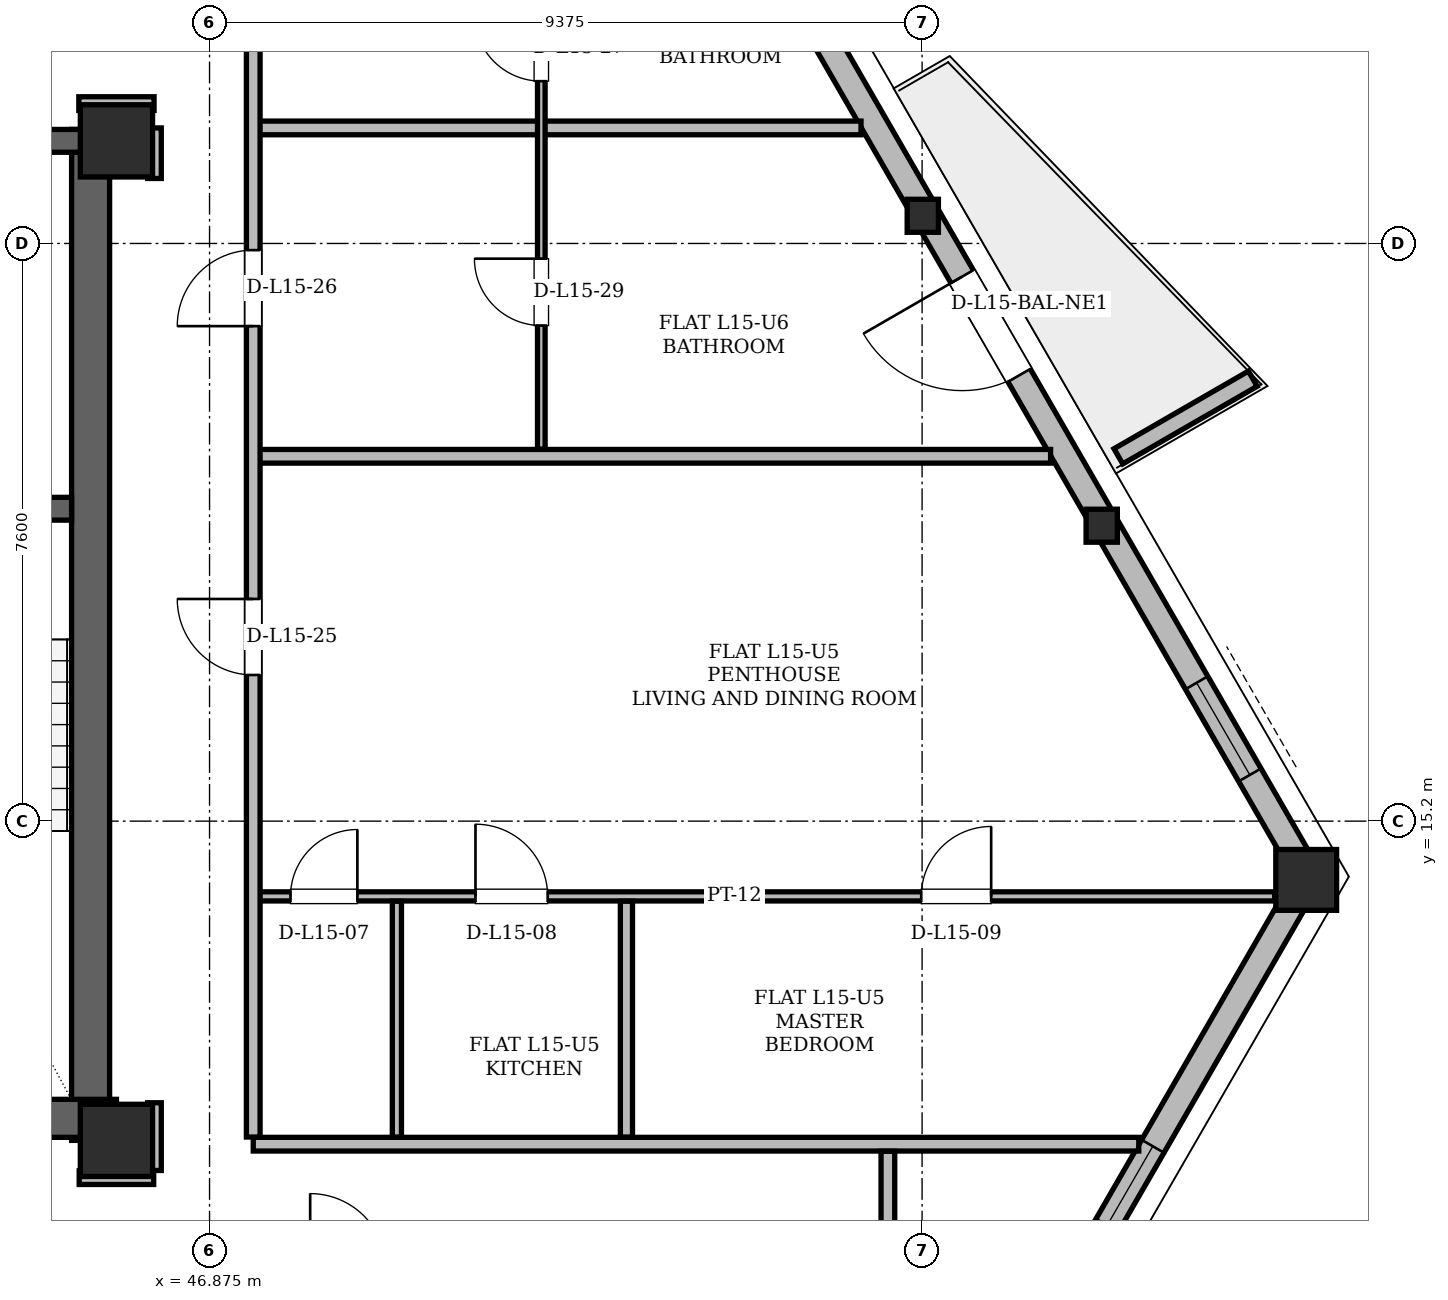
"""IFC4 building model, lengths in metres.
Left out: names, types, materials, properties, quantities, classifications, styles, units other than length and angle.
Written with IfcOpenShell. Run it as: python <this file> out.ifc"""

import sys

from ifc_helpers import new_model, si_unit, direction, frame, frame_2d, origin, origin_2d, place, context, subcontext, project, spatial, polyline, rectangle, hollow_rectangle, i_section, outline, extrude, element, fill, save


model = new_model("IFC4")
c1 = context("Model", 3, precision=1e-05, world=origin(), true_north=direction((0.0, 1.0)))
c2 = subcontext(c1, "Body", "Model", "MODEL_VIEW")
j1 = project(units=[si_unit("LENGTHUNIT", "METRE"), si_unit("PLANEANGLEUNIT", "RADIAN")], contexts=[c1])
p1 = place(None, origin())
s1 = spatial("IfcSite", under=j1, at=p1, CompositionType="ELEMENT")
p2 = place(p1, origin())
s2 = spatial("IfcBuilding", under=s1, at=p2, CompositionType="ELEMENT")
p3 = place(p2, frame((0.0, 0.0, 59.7)))
s3 = spatial("IfcBuildingStorey", under=s2, at=p3, CompositionType="ELEMENT", Elevation=59.7)
for number, where, z_axis, x_axis in (
    (1, (45.65, 11.0, 0.0), (0.0, 0.0, 1.0), (1.0, 0.0, 0.0)),
    (2, (45.65, 24.15, 0.0), (0.0, 0.0, 1.0), (1.0, 0.0, 0.0)),
):
    element("IfcColumn", number, at=place(p3, frame(where, z_axis=z_axis, x_axis=x_axis)), inside=s3, PredefinedType="COLUMN", context=c2, shape_type="SweptSolid", body=[
        extrude(hollow_rectangle(XDim=0.95, YDim=0.95, WallThickness=0.08, at=origin_2d()), origin(), (0.0, 0.0, 1.0), 3.6),
    ])
p4 = place(p3, frame((61.334, 14.47, 0.005), z_axis=(-0.016990094732, -0.024261855277, 0.99956125328), x_axis=(0.819124112374, -0.573616325192, 0.0)))
e3 = element("IfcColumn", 3, at=p4, inside=s3, PredefinedType="COLUMN", context=c2, shape_type="SweptSolid", body=[
    extrude(hollow_rectangle(XDim=0.8, YDim=0.8, WallThickness=0.065, at=origin_2d()), origin(), (0.0, 0.0, 1.0), 3.592),
])
p5 = place(p3, frame((58.647, 19.124, 0.005), z_axis=(-0.01902969331, -0.02079673626, 0.999602604305), x_axis=(0.737754315113, -0.675069307947, 0.0)))
e4 = element("IfcColumn", 4, at=p5, inside=s3, PredefinedType="COLUMN", context=c2, shape_type="SweptSolid", body=[
    extrude(i_section(OverallWidth=0.411, OverallDepth=0.434, WebThickness=0.036, FlangeThickness=0.057, at=origin_2d()), origin(), (0.0, 0.0, 1.0), 3.592),
])
p6 = place(p3, frame((56.296, 23.196, 0.005), z_axis=(-0.020729269388, -0.017806782228, 0.999626538212), x_axis=(0.651610262095, -0.758553931064, 0.0)))
e5 = element("IfcColumn", 5, at=p6, inside=s3, PredefinedType="COLUMN", context=c2, shape_type="SweptSolid", body=[
    extrude(i_section(OverallWidth=0.411, OverallDepth=0.434, WebThickness=0.036, FlangeThickness=0.057, at=origin_2d()), origin(), (0.0, 0.0, 1.0), 3.592),
])
p7 = place(p3, frame((45.31, 11.0, 0.0), z_axis=(0.0, 0.0, 1.0), x_axis=(0.0, 1.0, 0.0)))
e6 = element("IfcWall", 6, at=p7, inside=s3, PredefinedType="SHEAR", context=c2, shape_type="SweptSolid", body=[
    extrude(rectangle(XDim=13.3, YDim=0.5, at=frame_2d((6.65, 0.0))), origin(), (0.0, 0.0, 1.0), 3.36),
])
p8 = place(p3, frame((38.55, 11.29, 0.0), z_axis=(0.0, 0.0, 1.0), x_axis=(1.0, 0.0, 0.0)))
e7 = element("IfcWall", 7, at=p8, inside=s3, PredefinedType="SHEAR", context=c2, shape_type="SweptSolid", body=[
    extrude(rectangle(XDim=7.1, YDim=0.5, at=frame_2d((3.55, 0.0))), origin(), (0.0, 0.0, 1.0), 3.36),
])
p9 = place(p3, frame((29.65, 24.15, 0.0), z_axis=(0.0, 0.0, 1.0), x_axis=(1.0, 0.0, 0.0)))
e8 = element("IfcWall", 8, at=p9, inside=s3, PredefinedType="SHEAR", context=c2, shape_type="SweptSolid", body=[
    extrude(rectangle(XDim=15.7, YDim=0.3, at=frame_2d((7.85, 0.0))), origin(), (0.0, 0.0, 1.0), 3.36),
])
p10 = place(p9, frame((1.7, 0.0, 0.0)))
e9 = element("IfcOpeningElement", 9, at=p10, cuts=e8, PredefinedType="OPENING", context=c2, shape_type="SweptSolid", body=[
    extrude(rectangle(XDim=1.2, YDim=2.2, at=frame_2d((0.6, 1.1))), frame((0.0, 0.15, 0.0), z_axis=(0.0, -1.0, 0.0), x_axis=(1.0, 0.0, 0.0)), (0.0, 0.0, 1.0), 0.3),
])
p11 = place(p9, frame((12.8, 0.0, 0.0)))
e10 = element("IfcOpeningElement", 10, at=p11, cuts=e8, PredefinedType="OPENING", context=c2, shape_type="SweptSolid", body=[
    extrude(rectangle(XDim=1.2, YDim=2.2, at=frame_2d((0.6, 1.1))), frame((0.0, 0.15, 0.0), z_axis=(0.0, -1.0, 0.0), x_axis=(1.0, 0.0, 0.0)), (0.0, 0.0, 1.0), 0.3),
])
p12 = place(p9, frame((6.55, 0.0, 0.0)))
e11 = element("IfcOpeningElement", 11, at=p12, cuts=e8, PredefinedType="OPENING", context=c2, shape_type="SweptSolid", body=[
    extrude(rectangle(XDim=0.9, YDim=2.05, at=frame_2d((0.45, 1.025))), frame((0.0, 0.15, 0.0), z_axis=(0.0, -1.0, 0.0), x_axis=(1.0, 0.0, 0.0)), (0.0, 0.0, 1.0), 0.3),
])
p13 = place(p9, frame((8.45, 0.0, 0.0)))
e12 = element("IfcOpeningElement", 12, at=p13, cuts=e8, PredefinedType="OPENING", context=c2, shape_type="SweptSolid", body=[
    extrude(rectangle(XDim=0.9, YDim=2.05, at=frame_2d((0.45, 1.025))), frame((0.0, 0.15, 0.0), z_axis=(0.0, -1.0, 0.0), x_axis=(1.0, 0.0, 0.0)), (0.0, 0.0, 1.0), 0.3),
])
p14 = place(p3, frame((41.05, 19.31, 0.0), z_axis=(0.0, 0.0, 1.0), x_axis=(1.0, 0.0, 0.0)))
e13 = element("IfcWall", 13, at=p14, inside=s3, PredefinedType="SHEAR", context=c2, shape_type="SweptSolid", body=[
    extrude(rectangle(XDim=4.01, YDim=0.3, at=frame_2d((2.005, 0.0))), origin(), (0.0, 0.0, 1.0), 3.36),
])
p15 = place(p14, frame((1.6, 0.0, 0.0)))
e14 = element("IfcOpeningElement", 14, at=p15, cuts=e13, PredefinedType="OPENING", context=c2, shape_type="SweptSolid", body=[
    extrude(rectangle(XDim=1.4, YDim=2.2, at=frame_2d((0.7, 1.1))), frame((0.0, 0.15, 0.0), z_axis=(0.0, -1.0, 0.0), x_axis=(1.0, 0.0, 0.0)), (0.0, 0.0, 1.0), 0.3),
])
p16 = place(p3, frame((54.292, 2.274, 0.0), z_axis=(0.0, 0.0, 1.0), x_axis=(0.499996557917, 0.866027391063, 0.0)))
e15 = element("IfcWall", 15, at=p16, inside=s3, PredefinedType="SOLIDWALL", context=c2, shape_type="SweptSolid", body=[
    extrude(rectangle(XDim=14.083, YDim=0.34, at=frame_2d((7.042, 0.0))), origin(), (0.0, 0.0, 1.0), 2.494),
])
p17 = place(p16, frame((8.787, 0.0, 0.85)))
e16 = element("IfcOpeningElement", 16, at=p17, cuts=e15, PredefinedType="OPENING", context=c2, shape_type="SweptSolid", body=[
    extrude(rectangle(XDim=1.2, YDim=1.48, at=frame_2d((0.6, 0.74))), frame((0.0, 0.17, 0.0), z_axis=(0.0, -1.0, 0.0), x_axis=(1.0, 0.0, 0.0)), (0.0, 0.0, 1.0), 0.34),
])
p18 = place(p3, frame((61.334, 14.47, 0.0), z_axis=(0.0, 0.0, 1.0), x_axis=(-0.499999743921, 0.866025551632, 0.0)))
e17 = element("IfcWall", 17, at=p18, inside=s3, PredefinedType="SOLIDWALL", context=c2, shape_type="SweptSolid", body=[
    extrude(rectangle(XDim=33.585, YDim=0.34, at=frame_2d((16.792, 0.0))), origin(), (0.0, 0.0, 1.0), 2.494),
])
p19 = place(p18, frame((7.615, 0.0, 0.0)))
e18 = element("IfcOpeningElement", 18, at=p19, cuts=e17, PredefinedType="OPENING", context=c2, shape_type="SweptSolid", body=[
    extrude(rectangle(XDim=1.5, YDim=2.2, at=frame_2d((0.75, 1.1))), frame((0.0, 0.17, 0.0), z_axis=(0.0, -1.0, 0.0), x_axis=(1.0, 0.0, 0.0)), (0.0, 0.0, 1.0), 0.34),
])
p20 = place(p18, frame((25.926, 0.0, 0.0)))
e19 = element("IfcOpeningElement", 19, at=p20, cuts=e17, PredefinedType="OPENING", context=c2, shape_type="SweptSolid", body=[
    extrude(rectangle(XDim=1.5, YDim=2.2, at=frame_2d((0.75, 1.1))), frame((0.0, 0.17, 0.0), z_axis=(0.0, -1.0, 0.0), x_axis=(1.0, 0.0, 0.0)), (0.0, 0.0, 1.0), 0.34),
])
p21 = place(p18, frame((1.544, 0.0, 0.85)))
e20 = element("IfcOpeningElement", 20, at=p21, cuts=e17, PredefinedType="OPENING", context=c2, shape_type="SweptSolid", body=[
    extrude(rectangle(XDim=1.4, YDim=1.534, at=frame_2d((0.7, 0.767))), frame((0.0, 0.17, 0.0), z_axis=(0.0, -1.0, 0.0), x_axis=(1.0, 0.0, 0.0)), (0.0, 0.0, 1.0), 0.34),
])
p22 = place(p18, frame((20.338, 0.0, 0.85)))
e21 = element("IfcOpeningElement", 21, at=p22, cuts=e17, PredefinedType="OPENING", context=c2, shape_type="SweptSolid", body=[
    extrude(rectangle(XDim=1.2, YDim=1.48, at=frame_2d((0.6, 0.74))), frame((0.0, 0.17, 0.0), z_axis=(0.0, -1.0, 0.0), x_axis=(1.0, 0.0, 0.0)), (0.0, 0.0, 1.0), 0.34),
])
p23 = place(p18, frame((29.519, 0.0, 0.85)))
e22 = element("IfcOpeningElement", 22, at=p23, cuts=e17, PredefinedType="OPENING", context=c2, shape_type="SweptSolid", body=[
    extrude(rectangle(XDim=2.2, YDim=1.534, at=frame_2d((1.1, 0.767))), frame((0.0, 0.17, 0.0), z_axis=(0.0, -1.0, 0.0), x_axis=(1.0, 0.0, 0.0)), (0.0, 0.0, 1.0), 0.34),
])
p24 = place(p18, frame((14.912, 0.0, 0.85)))
e23 = element("IfcOpeningElement", 23, at=p24, cuts=e17, PredefinedType="OPENING", context=c2, shape_type="SweptSolid", body=[
    extrude(rectangle(XDim=1.2, YDim=1.48, at=frame_2d((0.6, 0.74))), frame((0.0, 0.17, 0.0), z_axis=(0.0, -1.0, 0.0), x_axis=(1.0, 0.0, 0.0)), (0.0, 0.0, 1.0), 0.34),
])
p25 = place(p18, frame((17.664, 0.0, 0.85)))
e24 = element("IfcOpeningElement", 24, at=p25, cuts=e17, PredefinedType="OPENING", context=c2, shape_type="SweptSolid", body=[
    extrude(rectangle(XDim=1.2, YDim=1.48, at=frame_2d((0.6, 0.74))), frame((0.0, 0.17, 0.0), z_axis=(0.0, -1.0, 0.0), x_axis=(1.0, 0.0, 0.0)), (0.0, 0.0, 1.0), 0.34),
])
p26 = place(p3, frame((58.833, 20.0, 0.0), z_axis=(0.0, 0.0, 1.0), x_axis=(0.866012356593, 0.500022597718, 0.0)))
e25 = element("IfcWall", 25, at=p26, inside=s3, PredefinedType="PARAPET", context=c2, shape_type="SweptSolid", body=[
    extrude(outline(polyline([(0.0, 0.0), (2.042, 0.0), (2.042, 1.1), (0.0, 1.32), (0.0, 0.0)])), frame((0.0, 0.115, 0.0), z_axis=(0.0, -1.0, 0.0), x_axis=(1.0, 0.0, 0.0)), (0.0, 0.0, 1.0), 0.23),
])
p27 = place(p3, frame((45.16, 10.51, 0.0), z_axis=(0.0, 0.0, 1.0), x_axis=(1.0, 0.0, 0.0)))
e26 = element("IfcWall", 26, at=p27, inside=s3, PredefinedType="PARTITIONING", context=c2, shape_type="SweptSolid", body=[
    extrude(rectangle(XDim=0.98, YDim=0.18, at=frame_2d((0.49, 0.0))), origin(), (0.0, 0.0, 1.0), 2.738),
])
p28 = place(p3, frame((47.45, 10.95, 0.0), z_axis=(0.0, 0.0, 1.0), x_axis=(1.0, 0.0, 0.0)))
e27 = element("IfcWall", 27, at=p28, inside=s3, PredefinedType="PARTITIONING", context=c2, shape_type="SweptSolid", body=[
    extrude(rectangle(XDim=11.651, YDim=0.18, at=frame_2d((5.825, 0.0))), origin(), (0.0, 0.0, 1.0), 3.36),
])
p29 = place(p3, frame((47.4, 14.21, 0.0), z_axis=(0.0, 0.0, 1.0), x_axis=(1.0, 0.0, 0.0)))
e28 = element("IfcWall", 28, at=p29, inside=s3, PredefinedType="PARTITIONING", context=c2, shape_type="SweptSolid", body=[
    extrude(rectangle(XDim=13.489, YDim=0.12, at=frame_2d((6.744, 0.0))), origin(), (0.0, 0.0, 1.0), 2.738),
])
p30 = place(p29, frame((0.54, 0.0, 0.0)))
e29 = element("IfcOpeningElement", 29, at=p30, cuts=e28, PredefinedType="OPENING", context=c2, shape_type="SweptSolid", body=[
    extrude(rectangle(XDim=0.88, YDim=2.08, at=frame_2d((0.44, 1.04))), frame((0.0, 0.06, 0.0), z_axis=(0.0, -1.0, 0.0), x_axis=(1.0, 0.0, 0.0)), (0.0, 0.0, 1.0), 0.12),
])
p31 = place(p29, frame((2.974, 0.0, 0.0)))
e30 = element("IfcOpeningElement", 30, at=p31, cuts=e28, PredefinedType="OPENING", context=c2, shape_type="SweptSolid", body=[
    extrude(rectangle(XDim=0.95, YDim=2.1, at=frame_2d((0.475, 1.05))), frame((0.0, 0.06, 0.0), z_axis=(0.0, -1.0, 0.0), x_axis=(1.0, 0.0, 0.0)), (0.0, 0.0, 1.0), 0.12),
])
p32 = place(p29, frame((8.839, 0.0, 0.0)))
e31 = element("IfcOpeningElement", 31, at=p32, cuts=e28, PredefinedType="OPENING", context=c2, shape_type="SweptSolid", body=[
    extrude(rectangle(XDim=0.92, YDim=2.12, at=frame_2d((0.46, 1.06))), frame((0.0, 0.06, 0.0), z_axis=(0.0, -1.0, 0.0), x_axis=(1.0, 0.0, 0.0)), (0.0, 0.0, 1.0), 0.12),
])
p33 = place(p3, frame((47.45, 20.0, 0.0), z_axis=(0.0, 0.0, 1.0), x_axis=(1.0, 0.0, 0.0)))
e32 = element("IfcWall", 32, at=p33, inside=s3, PredefinedType="PARTITIONING", context=c2, shape_type="SweptSolid", body=[
    extrude(rectangle(XDim=10.491, YDim=0.18, at=frame_2d((5.246, 0.0))), origin(), (0.0, 0.0, 1.0), 3.36),
])
p34 = place(p3, frame((47.45, 24.32, 0.0), z_axis=(0.0, 0.0, 1.0), x_axis=(1.0, 0.0, 0.0)))
e33 = element("IfcWall", 33, at=p34, inside=s3, PredefinedType="PARTITIONING", context=c2, shape_type="SweptSolid", body=[
    extrude(rectangle(XDim=7.997, YDim=0.18, at=frame_2d((3.998, 0.0))), origin(), (0.0, 0.0, 1.0), 3.36),
])
p35 = place(p3, frame((45.155, 24.64, 0.0), z_axis=(0.0, 0.0, 1.0), x_axis=(1.0, 0.0, 0.0)))
e34 = element("IfcWall", 34, at=p35, inside=s3, PredefinedType="PARTITIONING", context=c2, shape_type="SweptSolid", body=[
    extrude(rectangle(XDim=0.99, YDim=0.18, at=frame_2d((0.495, 0.0))), origin(), (0.0, 0.0, 1.0), 2.738),
])
p36 = place(p3, frame((46.15, 10.604, 0.0), z_axis=(0.0, 0.0, 1.0), x_axis=(0.0, 1.0, 0.0)))
e35 = element("IfcWall", 35, at=p36, inside=s3, PredefinedType="PARTITIONING", context=c2, shape_type="SweptSolid", body=[
    extrude(rectangle(XDim=0.891, YDim=0.18, at=frame_2d((0.446, 0.0))), origin(), (0.0, 0.0, 1.0), 2.738),
])
p37 = place(p3, frame((46.15, 23.655, 0.0), z_axis=(0.0, 0.0, 1.0), x_axis=(0.0, 1.0, 0.0)))
e36 = element("IfcWall", 36, at=p37, inside=s3, PredefinedType="PARTITIONING", context=c2, shape_type="SweptSolid", body=[
    extrude(rectangle(XDim=0.665, YDim=0.18, at=frame_2d((0.333, 0.0))), origin(), (0.0, 0.0, 1.0), 2.946),
])
p38 = place(p3, frame((47.45, 11.044, 0.0), z_axis=(0.0, 0.0, 1.0), x_axis=(0.0, 1.0, 0.0)))
e37 = element("IfcWall", 37, at=p38, inside=s3, PredefinedType="PARTITIONING", context=c2, shape_type="SweptSolid", body=[
    extrude(rectangle(XDim=14.832, YDim=0.18, at=frame_2d((7.416, 0.0))), origin(), (0.0, 0.0, 1.0), 2.738),
])
p39 = place(p38, frame((6.079, 0.0, 0.0)))
e38 = element("IfcOpeningElement", 38, at=p39, cuts=e37, PredefinedType="OPENING", context=c2, shape_type="SweptSolid", body=[
    extrude(rectangle(XDim=1.0, YDim=2.18, at=frame_2d((0.5, 1.09))), frame((0.0, 0.09, 0.0), z_axis=(0.0, -1.0, 0.0), x_axis=(1.0, 0.0, 0.0)), (0.0, 0.0, 1.0), 0.18),
])
p40 = place(p38, frame((10.668, 0.0, 0.0)))
e39 = element("IfcOpeningElement", 39, at=p40, cuts=e37, PredefinedType="OPENING", context=c2, shape_type="SweptSolid", body=[
    extrude(rectangle(XDim=1.0, YDim=2.18, at=frame_2d((0.5, 1.09))), frame((0.0, 0.09, 0.0), z_axis=(0.0, -1.0, 0.0), x_axis=(1.0, 0.0, 0.0)), (0.0, 0.0, 1.0), 0.18),
])
p41 = place(p3, frame((49.34, 11.044, 0.0), z_axis=(0.0, 0.0, 1.0), x_axis=(0.0, 1.0, 0.0)))
e40 = element("IfcWall", 40, at=p41, inside=s3, PredefinedType="PARTITIONING", context=c2, shape_type="SweptSolid", body=[
    extrude(rectangle(XDim=3.102, YDim=0.12, at=frame_2d((1.551, 0.0))), origin(), (0.0, 0.0, 1.0), 2.738),
])
p42 = place(p3, frame((51.24, 20.094, 0.0), z_axis=(0.0, 0.0, 1.0), x_axis=(0.0, 1.0, 0.0)))
e41 = element("IfcWall", 41, at=p42, inside=s3, PredefinedType="PARTITIONING", context=c2, shape_type="SweptSolid", body=[
    extrude(rectangle(XDim=11.512, YDim=0.1, at=frame_2d((5.756, 0.0))), origin(), (0.0, 0.0, 1.0), 2.494),
])
p43 = place(p42, frame((4.841, 0.0, 0.0)))
e42 = element("IfcOpeningElement", 42, at=p43, cuts=e41, PredefinedType="OPENING", context=c2, shape_type="SweptSolid", body=[
    extrude(rectangle(XDim=0.88, YDim=2.08, at=frame_2d((0.44, 1.04))), frame((0.0, 0.05, 0.0), z_axis=(0.0, -1.0, 0.0), x_axis=(1.0, 0.0, 0.0)), (0.0, 0.0, 1.0), 0.1),
])
p44 = place(p42, frame((8.499, 0.0, 0.0)))
e43 = element("IfcOpeningElement", 43, at=p44, cuts=e41, PredefinedType="OPENING", context=c2, shape_type="SweptSolid", body=[
    extrude(rectangle(XDim=0.95, YDim=2.1, at=frame_2d((0.475, 1.05))), frame((0.0, 0.05, 0.0), z_axis=(0.0, -1.0, 0.0), x_axis=(1.0, 0.0, 0.0)), (0.0, 0.0, 1.0), 0.1),
])
p45 = place(p42, frame((1.626, 0.0, 0.0)))
e44 = element("IfcOpeningElement", 44, at=p45, cuts=e41, PredefinedType="OPENING", context=c2, shape_type="SweptSolid", body=[
    extrude(rectangle(XDim=0.88, YDim=2.08, at=frame_2d((0.44, 1.04))), frame((0.0, 0.05, 0.0), z_axis=(0.0, -1.0, 0.0), x_axis=(1.0, 0.0, 0.0)), (0.0, 0.0, 1.0), 0.1),
])
p46 = place(p3, frame((52.36, 11.044, 0.0), z_axis=(0.0, 0.0, 1.0), x_axis=(0.0, 1.0, 0.0)))
e45 = element("IfcWall", 45, at=p46, inside=s3, PredefinedType="PARTITIONING", context=c2, shape_type="SweptSolid", body=[
    extrude(rectangle(XDim=3.102, YDim=0.16, at=frame_2d((1.551, 0.0))), origin(), (0.0, 0.0, 1.0), 2.738),
])
p47 = place(p3, frame((55.8, 9.394, 0.0), z_axis=(0.0, 0.0, 1.0), x_axis=(0.0, 1.0, 0.0)))
e46 = element("IfcWall", 46, at=p47, inside=s3, PredefinedType="PARTITIONING", context=c2, shape_type="SweptSolid", body=[
    extrude(rectangle(XDim=1.462, YDim=0.18, at=frame_2d((0.731, 0.0))), origin(), (0.0, 0.0, 1.0), 3.36),
])
p48 = place(p19, origin())
e47 = element("IfcDoor", 47, at=p48, inside=s3, OperationType="SINGLE_SWING_RIGHT", PredefinedType="DOOR", context=c2, shape_type="SweptSolid", body=[
    extrude(rectangle(XDim=1.5, YDim=2.2, at=frame_2d((0.75, 1.1))), frame((0.0, 0.025, 0.0), z_axis=(0.0, -1.0, 0.0), x_axis=(1.0, 0.0, 0.0)), (0.0, 0.0, 1.0), 0.05),
])
fill(e18, e47)
p49 = place(p21, origin())
e48 = element("IfcWindow", 48, at=p49, inside=s3, PartitioningType="SINGLE_PANEL", PredefinedType="WINDOW", context=c2, shape_type="SweptSolid", body=[
    extrude(rectangle(XDim=1.4, YDim=1.534, at=frame_2d((0.7, 0.767))), frame((0.0, 0.03, 0.0), z_axis=(0.0, -1.0, 0.0), x_axis=(1.0, 0.0, 0.0)), (0.0, 0.0, 1.0), 0.06),
])
fill(e20, e48)
p50 = place(p17, origin())
e49 = element("IfcWindow", 49, at=p50, inside=s3, PartitioningType="SINGLE_PANEL", PredefinedType="WINDOW", context=c2, shape_type="SweptSolid", body=[
    extrude(rectangle(XDim=1.2, YDim=1.48, at=frame_2d((0.6, 0.74))), frame((0.0, 0.03, 0.0), z_axis=(0.0, -1.0, 0.0), x_axis=(1.0, 0.0, 0.0)), (0.0, 0.0, 1.0), 0.06),
])
fill(e16, e49)
p51 = place(p30, origin())
e50 = element("IfcDoor", 50, at=p51, inside=s3, OperationType="SINGLE_SWING_RIGHT", PredefinedType="DOOR", context=c2, shape_type="SweptSolid", body=[
    extrude(rectangle(XDim=0.88, YDim=2.08, at=frame_2d((0.44, 1.04))), frame((0.0, 0.025, 0.0), z_axis=(0.0, -1.0, 0.0), x_axis=(1.0, 0.0, 0.0)), (0.0, 0.0, 1.0), 0.05),
])
fill(e29, e50)
p52 = place(p31, origin())
e51 = element("IfcDoor", 51, at=p52, inside=s3, OperationType="SINGLE_SWING_LEFT", PredefinedType="DOOR", context=c2, shape_type="SweptSolid", body=[
    extrude(rectangle(XDim=0.95, YDim=2.1, at=frame_2d((0.475, 1.05))), frame((0.0, 0.025, 0.0), z_axis=(0.0, -1.0, 0.0), x_axis=(1.0, 0.0, 0.0)), (0.0, 0.0, 1.0), 0.05),
])
fill(e30, e51)
p53 = place(p32, origin())
e52 = element("IfcDoor", 52, at=p53, inside=s3, OperationType="SINGLE_SWING_RIGHT", PredefinedType="DOOR", context=c2, shape_type="SweptSolid", body=[
    extrude(rectangle(XDim=0.92, YDim=2.12, at=frame_2d((0.46, 1.06))), frame((0.0, 0.025, 0.0), z_axis=(0.0, -1.0, 0.0), x_axis=(1.0, 0.0, 0.0)), (0.0, 0.0, 1.0), 0.05),
])
fill(e31, e52)
p54 = place(p39, origin())
e53 = element("IfcDoor", 53, at=p54, inside=s3, OperationType="SINGLE_SWING_RIGHT", PredefinedType="DOOR", context=c2, shape_type="SweptSolid", body=[
    extrude(rectangle(XDim=1.0, YDim=2.18, at=frame_2d((0.5, 1.09))), frame((0.0, 0.025, 0.0), z_axis=(0.0, -1.0, 0.0), x_axis=(1.0, 0.0, 0.0)), (0.0, 0.0, 1.0), 0.05),
])
fill(e38, e53)
p55 = place(p40, origin())
e54 = element("IfcDoor", 54, at=p55, inside=s3, OperationType="SINGLE_SWING_LEFT", PredefinedType="DOOR", context=c2, shape_type="SweptSolid", body=[
    extrude(rectangle(XDim=1.0, YDim=2.18, at=frame_2d((0.5, 1.09))), frame((0.0, 0.025, 0.0), z_axis=(0.0, -1.0, 0.0), x_axis=(1.0, 0.0, 0.0)), (0.0, 0.0, 1.0), 0.05),
])
fill(e39, e54)
p56 = place(p43, origin())
e55 = element("IfcDoor", 55, at=p56, inside=s3, OperationType="SINGLE_SWING_RIGHT", PredefinedType="DOOR", context=c2, shape_type="SweptSolid", body=[
    extrude(rectangle(XDim=0.88, YDim=2.08, at=frame_2d((0.44, 1.04))), frame((0.0, 0.025, 0.0), z_axis=(0.0, -1.0, 0.0), x_axis=(1.0, 0.0, 0.0)), (0.0, 0.0, 1.0), 0.05),
])
fill(e42, e55)
p57 = place(p45, origin())
e56 = element("IfcDoor", 56, at=p57, inside=s3, OperationType="SINGLE_SWING_RIGHT", PredefinedType="DOOR", context=c2, shape_type="SweptSolid", body=[
    extrude(rectangle(XDim=0.88, YDim=2.08, at=frame_2d((0.44, 1.04))), frame((0.0, 0.025, 0.0), z_axis=(0.0, -1.0, 0.0), x_axis=(1.0, 0.0, 0.0)), (0.0, 0.0, 1.0), 0.05),
])
fill(e44, e56)
save(model, sys.argv[1])
